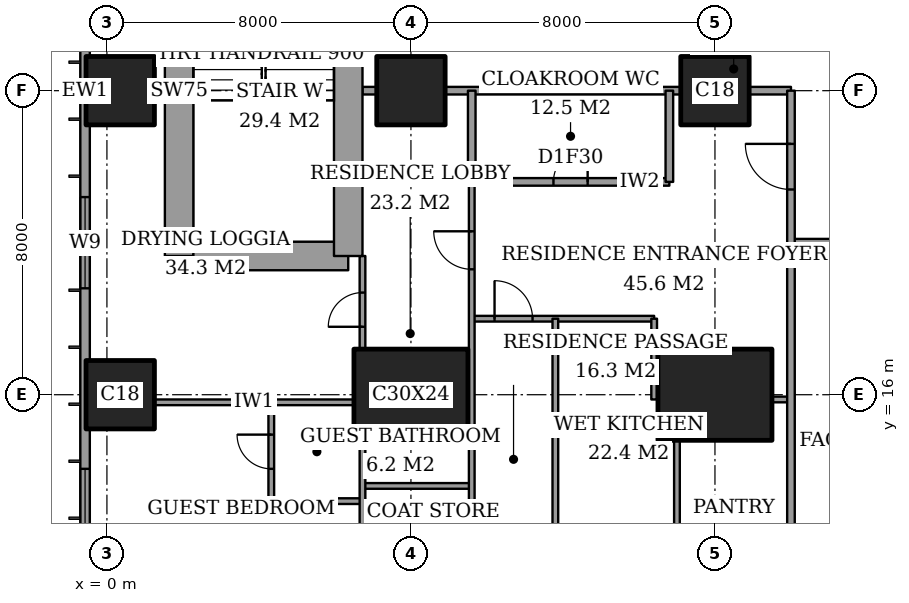
"""IFC4 building model, lengths in metres.
Left out: names, types, materials, properties, quantities, classifications, styles, units other than length and angle.
Written with IfcOpenShell. Run it as: python <this file> out.ifc"""

import sys

from ifc_helpers import new_model, si_unit, direction, frame, frame_2d, origin, origin_2d, place, context, subcontext, project, spatial, rectangle, extrude, element, fill, save


model = new_model("IFC4")
c1 = context("Model", 3, precision=1e-05, world=origin(), true_north=direction((0.0, 1.0)))
c2 = subcontext(c1, "Body", "Model", "MODEL_VIEW")
j1 = project(units=[si_unit("LENGTHUNIT", "METRE"), si_unit("PLANEANGLEUNIT", "RADIAN")], contexts=[c1])
p1 = place(None, origin())
s1 = spatial("IfcSite", under=j1, at=p1, CompositionType="ELEMENT")
p2 = place(p1, origin())
s2 = spatial("IfcBuilding", under=s1, at=p2, CompositionType="ELEMENT")
p3 = place(p2, frame((0.0, 0.0, 182.2)))
s3 = spatial("IfcBuildingStorey", under=s2, at=p3, CompositionType="ELEMENT", Elevation=182.2)
for number, where, z_axis, x_axis in (
    (1, (0.35, 16.0, 0.0), (0.0, 0.0, 1.0), (1.0, 0.0, 0.0)),
    (2, (0.35, 24.0, 0.0), (0.0, 0.0, 1.0), (1.0, 0.0, 0.0)),
):
    element("IfcColumn", number, at=place(p3, frame(where, z_axis=z_axis, x_axis=x_axis)), inside=s3, PredefinedType="COLUMN", context=c2, shape_type="SweptSolid", body=[
        extrude(rectangle(XDim=1.8, YDim=1.8, at=origin_2d()), origin(), (0.0, 0.0, 1.0), 3.6),
    ])
p4 = place(p3, frame((8.0, 16.0, 0.0), z_axis=(0.0, 0.0, 1.0), x_axis=(1.0, 0.0, 0.0)))
e3 = element("IfcColumn", 3, at=p4, inside=s3, PredefinedType="COLUMN", context=c2, shape_type="SweptSolid", body=[
    extrude(rectangle(XDim=3.0, YDim=2.4, at=origin_2d()), origin(), (0.0, 0.0, 1.0), 3.6),
])
p5 = place(p3, frame((8.0, 24.0, 0.0), z_axis=(0.0, 0.0, 1.0), x_axis=(1.0, 0.0, 0.0)))
e4 = element("IfcColumn", 4, at=p5, inside=s3, PredefinedType="COLUMN", context=c2, shape_type="SweptSolid", body=[
    extrude(rectangle(XDim=1.8, YDim=1.8, at=origin_2d()), origin(), (0.0, 0.0, 1.0), 3.6),
])
p6 = place(p3, frame((16.0, 16.0, 0.0), z_axis=(0.0, 0.0, 1.0), x_axis=(1.0, 0.0, 0.0)))
e5 = element("IfcColumn", 5, at=p6, inside=s3, PredefinedType="COLUMN", context=c2, shape_type="SweptSolid", body=[
    extrude(rectangle(XDim=3.0, YDim=2.4, at=origin_2d()), origin(), (0.0, 0.0, 1.0), 3.6),
])
p7 = place(p3, frame((16.0, 24.0, 0.0), z_axis=(0.0, 0.0, 1.0), x_axis=(1.0, 0.0, 0.0)))
e6 = element("IfcColumn", 6, at=p7, inside=s3, PredefinedType="COLUMN", context=c2, shape_type="SweptSolid", body=[
    extrude(rectangle(XDim=1.8, YDim=1.8, at=origin_2d()), origin(), (0.0, 0.0, 1.0), 3.6),
])
p8 = place(p3, frame((1.9, 19.65, 0.0), z_axis=(0.0, 0.0, 1.0), x_axis=(1.0, 0.0, 0.0)))
e7 = element("IfcWall", 7, at=p8, inside=s3, PredefinedType="SHEAR", context=c2, shape_type="SweptSolid", body=[
    extrude(rectangle(XDim=4.45, YDim=0.75, at=frame_2d((2.225, 0.0))), origin(), (0.0, 0.0, 1.0), 3.6),
])
p9 = place(p3, frame((6.35, 19.65, 0.0), z_axis=(0.0, 0.0, 1.0), x_axis=(0.0, 1.0, 0.0)))
e8 = element("IfcWall", 8, at=p9, inside=s3, PredefinedType="SHEAR", context=c2, shape_type="SweptSolid", body=[
    extrude(rectangle(XDim=8.7, YDim=0.75, at=frame_2d((4.35, 0.0))), origin(), (0.0, 0.0, 1.0), 3.6),
])
p10 = place(p9, frame((6.725, 0.0, 0.0)))
e9 = element("IfcOpeningElement", 9, at=p10, cuts=e8, PredefinedType="OPENING", context=c2, shape_type="SweptSolid", body=[
    extrude(rectangle(XDim=1.0, YDim=2.1, at=frame_2d((0.5, 1.05))), frame((0.0, 0.385, 0.0), z_axis=(0.0, -1.0, 0.0), x_axis=(1.0, 0.0, 0.0)), (0.0, 0.0, 1.0), 0.77),
])
p11 = place(p3, frame((1.9, 28.35, 0.0), z_axis=(0.0, 0.0, 1.0), x_axis=(0.0, -1.0, 0.0)))
e10 = element("IfcWall", 10, at=p11, inside=s3, PredefinedType="SHEAR", context=c2, shape_type="SweptSolid", body=[
    extrude(rectangle(XDim=8.7, YDim=0.75, at=frame_2d((4.35, 0.0))), origin(), (0.0, 0.0, 1.0), 3.6),
])
p12 = place(p3, frame((-0.575, 44.825, 0.0), z_axis=(0.0, 0.0, 1.0), x_axis=(0.0, -1.0, 0.0)))
e11 = element("IfcWall", 11, at=p12, inside=s3, PredefinedType="SOLIDWALL", context=c2, shape_type="SweptSolid", body=[
    extrude(rectangle(XDim=41.65, YDim=0.25, at=frame_2d((20.825, 0.0))), origin(), (0.0, 0.0, 1.0), 3.6),
])
p13 = place(p12, frame((0.825, 0.0, 0.2)))
e12 = element("IfcOpeningElement", 12, at=p13, cuts=e11, PredefinedType="OPENING", context=c2, shape_type="SweptSolid", body=[
    extrude(rectangle(XDim=2.4, YDim=2.4, at=frame_2d((1.2, 1.2))), frame((0.0, 0.135, 0.0), z_axis=(0.0, -1.0, 0.0), x_axis=(1.0, 0.0, 0.0)), (0.0, 0.0, 1.0), 0.27),
])
p14 = place(p12, frame((6.05, 0.0, 0.2)))
e13 = element("IfcOpeningElement", 13, at=p14, cuts=e11, PredefinedType="OPENING", context=c2, shape_type="SweptSolid", body=[
    extrude(rectangle(XDim=1.2, YDim=2.4, at=frame_2d((0.6, 1.2))), frame((0.0, 0.135, 0.0), z_axis=(0.0, -1.0, 0.0), x_axis=(1.0, 0.0, 0.0)), (0.0, 0.0, 1.0), 0.27),
])
p15 = place(p12, frame((8.475, 0.0, 0.2)))
e14 = element("IfcOpeningElement", 14, at=p15, cuts=e11, PredefinedType="OPENING", context=c2, shape_type="SweptSolid", body=[
    extrude(rectangle(XDim=2.4, YDim=2.4, at=frame_2d((1.2, 1.2))), frame((0.0, 0.135, 0.0), z_axis=(0.0, -1.0, 0.0), x_axis=(1.0, 0.0, 0.0)), (0.0, 0.0, 1.0), 0.27),
])
p16 = place(p12, frame((15.625, 0.0, 0.2)))
e15 = element("IfcOpeningElement", 15, at=p16, cuts=e11, PredefinedType="OPENING", context=c2, shape_type="SweptSolid", body=[
    extrude(rectangle(XDim=2.4, YDim=2.4, at=frame_2d((1.2, 1.2))), frame((0.0, 0.135, 0.0), z_axis=(0.0, -1.0, 0.0), x_axis=(1.0, 0.0, 0.0)), (0.0, 0.0, 1.0), 0.27),
])
p17 = place(p12, frame((23.625, 0.0, 0.2)))
e16 = element("IfcOpeningElement", 16, at=p17, cuts=e11, PredefinedType="OPENING", context=c2, shape_type="SweptSolid", body=[
    extrude(rectangle(XDim=2.4, YDim=2.4, at=frame_2d((1.2, 1.2))), frame((0.0, 0.135, 0.0), z_axis=(0.0, -1.0, 0.0), x_axis=(1.0, 0.0, 0.0)), (0.0, 0.0, 1.0), 0.27),
])
p18 = place(p12, frame((30.775, 0.0, 0.2)))
e17 = element("IfcOpeningElement", 17, at=p18, cuts=e11, PredefinedType="OPENING", context=c2, shape_type="SweptSolid", body=[
    extrude(rectangle(XDim=2.4, YDim=2.4, at=frame_2d((1.2, 1.2))), frame((0.0, 0.135, 0.0), z_axis=(0.0, -1.0, 0.0), x_axis=(1.0, 0.0, 0.0)), (0.0, 0.0, 1.0), 0.27),
])
p19 = place(p12, frame((34.55, 0.0, 0.2)))
e18 = element("IfcOpeningElement", 18, at=p19, cuts=e11, PredefinedType="OPENING", context=c2, shape_type="SweptSolid", body=[
    extrude(rectangle(XDim=1.2, YDim=2.4, at=frame_2d((0.6, 1.2))), frame((0.0, 0.135, 0.0), z_axis=(0.0, -1.0, 0.0), x_axis=(1.0, 0.0, 0.0)), (0.0, 0.0, 1.0), 0.27),
])
p20 = place(p12, frame((38.425, 0.0, 0.2)))
e19 = element("IfcOpeningElement", 19, at=p20, cuts=e11, PredefinedType="OPENING", context=c2, shape_type="SweptSolid", body=[
    extrude(rectangle(XDim=2.4, YDim=2.4, at=frame_2d((1.2, 1.2))), frame((0.0, 0.135, 0.0), z_axis=(0.0, -1.0, 0.0), x_axis=(1.0, 0.0, 0.0)), (0.0, 0.0, 1.0), 0.27),
])
p21 = place(p3, frame((4.325, 13.2, 0.0), z_axis=(0.0, 0.0, 1.0), x_axis=(1.0, 0.0, 0.0)))
e20 = element("IfcWall", 20, at=p21, inside=s3, PredefinedType="PARTITIONING", context=c2, shape_type="SweptSolid", body=[
    extrude(rectangle(XDim=2.4, YDim=0.15, at=frame_2d((1.2, 0.0))), origin(), (0.0, 0.0, 1.0), 3.35),
])
p22 = place(p3, frame((6.725, 13.6, 0.0), z_axis=(0.0, 0.0, 1.0), x_axis=(1.0, 0.0, 0.0)))
e21 = element("IfcWall", 21, at=p22, inside=s3, PredefinedType="PARTITIONING", context=c2, shape_type="SweptSolid", body=[
    extrude(rectangle(XDim=2.875, YDim=0.15, at=frame_2d((1.438, 0.0))), origin(), (0.0, 0.0, 1.0), 3.35),
])
p23 = place(p3, frame((1.25, 15.8, 0.0), z_axis=(0.0, 0.0, 1.0), x_axis=(1.0, 0.0, 0.0)))
e22 = element("IfcWall", 22, at=p23, inside=s3, PredefinedType="PARTITIONING", context=c2, shape_type="SweptSolid", body=[
    extrude(rectangle(XDim=5.25, YDim=0.15, at=frame_2d((2.625, 0.0))), origin(), (0.0, 0.0, 1.0), 3.35),
])
p24 = place(p3, frame((17.5, 15.875, 0.0), z_axis=(0.0, 0.0, 1.0), x_axis=(1.0, 0.0, 0.0)))
e23 = element("IfcWall", 23, at=p24, inside=s3, PredefinedType="PARTITIONING", context=c2, shape_type="SweptSolid", body=[
    extrude(rectangle(XDim=0.5, YDim=0.15, at=frame_2d((0.25, 0.0))), origin(), (0.0, 0.0, 1.0), 2.634),
])
p25 = place(p3, frame((9.6, 18.0, 0.0), z_axis=(0.0, 0.0, 1.0), x_axis=(1.0, 0.0, 0.0)))
e24 = element("IfcWall", 24, at=p25, inside=s3, PredefinedType="PARTITIONING", context=c2, shape_type="SweptSolid", body=[
    extrude(rectangle(XDim=4.8, YDim=0.15, at=frame_2d((2.4, 0.0))), origin(), (0.0, 0.0, 1.0), 3.35),
])
p26 = place(p25, frame((0.6, 0.0, 0.0)))
e25 = element("IfcOpeningElement", 25, at=p26, cuts=e24, PredefinedType="OPENING", context=c2, shape_type="SweptSolid", body=[
    extrude(rectangle(XDim=1.0, YDim=2.1, at=frame_2d((0.5, 1.05))), frame((0.0, 0.085, 0.0), z_axis=(0.0, -1.0, 0.0), x_axis=(1.0, 0.0, 0.0)), (0.0, 0.0, 1.0), 0.17),
])
p27 = place(p3, frame((18.0, 20.0, 0.0), z_axis=(0.0, 0.0, 1.0), x_axis=(1.0, 0.0, 0.0)))
e26 = element("IfcWall", 26, at=p27, inside=s3, PredefinedType="PARTITIONING", context=c2, shape_type="SweptSolid", body=[
    extrude(rectangle(XDim=6.0, YDim=0.2, at=frame_2d((3.0, 0.0))), origin(), (0.0, 0.0, 1.0), 3.35),
])
p28 = place(p27, frame((2.5, 0.0, 0.0)))
e27 = element("IfcOpeningElement", 27, at=p28, cuts=e26, PredefinedType="OPENING", context=c2, shape_type="SweptSolid", body=[
    extrude(rectangle(XDim=1.0, YDim=2.1, at=frame_2d((0.5, 1.05))), frame((0.0, 0.11, 0.0), z_axis=(0.0, -1.0, 0.0), x_axis=(1.0, 0.0, 0.0)), (0.0, 0.0, 1.0), 0.22),
])
p29 = place(p3, frame((9.6, 21.6, 0.0), z_axis=(0.0, 0.0, 1.0), x_axis=(1.0, 0.0, 0.0)))
e28 = element("IfcWall", 28, at=p29, inside=s3, PredefinedType="PARTITIONING", context=c2, shape_type="SweptSolid", body=[
    extrude(rectangle(XDim=5.2, YDim=0.2, at=frame_2d((2.6, 0.0))), origin(), (0.0, 0.0, 1.0), 3.35),
])
p30 = place(p29, frame((2.15, 0.0, 0.0)))
e29 = element("IfcOpeningElement", 29, at=p30, cuts=e28, PredefinedType="OPENING", context=c2, shape_type="SweptSolid", body=[
    extrude(rectangle(XDim=0.9, YDim=2.1, at=frame_2d((0.45, 1.05))), frame((0.0, 0.11, 0.0), z_axis=(0.0, -1.0, 0.0), x_axis=(1.0, 0.0, 0.0)), (0.0, 0.0, 1.0), 0.22),
])
p31 = place(p3, frame((6.725, 24.0, 0.0), z_axis=(0.0, 0.0, 1.0), x_axis=(1.0, 0.0, 0.0)))
e30 = element("IfcWall", 30, at=p31, inside=s3, PredefinedType="PARTITIONING", context=c2, shape_type="SweptSolid", body=[
    extrude(rectangle(XDim=0.375, YDim=0.2, at=frame_2d((0.188, 0.0))), origin(), (0.0, 0.0, 1.0), 3.35),
])
p32 = place(p3, frame((8.9, 24.0, 0.0), z_axis=(0.0, 0.0, 1.0), x_axis=(1.0, 0.0, 0.0)))
e31 = element("IfcWall", 31, at=p32, inside=s3, PredefinedType="PARTITIONING", context=c2, shape_type="SweptSolid", body=[
    extrude(rectangle(XDim=6.2, YDim=0.2, at=frame_2d((3.1, 0.0))), origin(), (0.0, 0.0, 1.0), 3.35),
])
p33 = place(p3, frame((16.9, 24.0, 0.0), z_axis=(0.0, 0.0, 1.0), x_axis=(1.0, 0.0, 0.0)))
e32 = element("IfcWall", 32, at=p33, inside=s3, PredefinedType="PARTITIONING", context=c2, shape_type="SweptSolid", body=[
    extrude(rectangle(XDim=1.1, YDim=0.2, at=frame_2d((0.55, 0.0))), origin(), (0.0, 0.0, 1.0), 3.35),
])
p34 = place(p3, frame((4.325, 13.2, 0.0), z_axis=(0.0, 0.0, 1.0), x_axis=(0.0, 1.0, 0.0)))
e33 = element("IfcWall", 33, at=p34, inside=s3, PredefinedType="PARTITIONING", context=c2, shape_type="SweptSolid", body=[
    extrude(rectangle(XDim=2.6, YDim=0.15, at=frame_2d((1.3, 0.0))), origin(), (0.0, 0.0, 1.0), 3.35),
])
p35 = place(p34, frame((0.85, 0.0, 0.0)))
e34 = element("IfcOpeningElement", 34, at=p35, cuts=e33, PredefinedType="OPENING", context=c2, shape_type="SweptSolid", body=[
    extrude(rectangle(XDim=0.9, YDim=2.1, at=frame_2d((0.45, 1.05))), frame((0.0, 0.085, 0.0), z_axis=(0.0, -1.0, 0.0), x_axis=(1.0, 0.0, 0.0)), (0.0, 0.0, 1.0), 0.17),
])
p36 = place(p3, frame((6.725, 10.6, 0.0), z_axis=(0.0, 0.0, 1.0), x_axis=(0.0, 1.0, 0.0)))
e35 = element("IfcWall", 35, at=p36, inside=s3, PredefinedType="PARTITIONING", context=c2, shape_type="SweptSolid", body=[
    extrude(rectangle(XDim=4.2, YDim=0.15, at=frame_2d((2.1, 0.0))), origin(), (0.0, 0.0, 1.0), 3.35),
])
p37 = place(p3, frame((6.725, 17.2, 0.0), z_axis=(0.0, 0.0, 1.0), x_axis=(0.0, 1.0, 0.0)))
e36 = element("IfcWall", 36, at=p37, inside=s3, PredefinedType="PARTITIONING", context=c2, shape_type="SweptSolid", body=[
    extrude(rectangle(XDim=2.45, YDim=0.15, at=frame_2d((1.225, 0.0))), origin(), (0.0, 0.0, 1.0), 3.35),
])
p38 = place(p37, frame((0.587, 0.0, 0.0)))
e37 = element("IfcOpeningElement", 37, at=p38, cuts=e36, PredefinedType="OPENING", context=c2, shape_type="SweptSolid", body=[
    extrude(rectangle(XDim=0.9, YDim=2.1, at=frame_2d((0.45, 1.05))), frame((0.0, 0.085, 0.0), z_axis=(0.0, -1.0, 0.0), x_axis=(1.0, 0.0, 0.0)), (0.0, 0.0, 1.0), 0.17),
])
p39 = place(p3, frame((9.6, 21.6, 0.0), z_axis=(0.0, 0.0, 1.0), x_axis=(0.0, 1.0, 0.0)))
e38 = element("IfcWall", 38, at=p39, inside=s3, PredefinedType="PARTITIONING", context=c2, shape_type="SweptSolid", body=[
    extrude(rectangle(XDim=2.4, YDim=0.2, at=frame_2d((1.2, 0.0))), origin(), (0.0, 0.0, 1.0), 3.35),
])
p40 = place(p3, frame((9.6, 10.6, 0.0), z_axis=(0.0, 0.0, 1.0), x_axis=(0.0, 1.0, 0.0)))
e39 = element("IfcWall", 39, at=p40, inside=s3, PredefinedType="PARTITIONING", context=c2, shape_type="SweptSolid", body=[
    extrude(rectangle(XDim=11.0, YDim=0.15, at=frame_2d((5.5, 0.0))), origin(), (0.0, 0.0, 1.0), 3.35),
])
p41 = place(p40, frame((8.7, 0.0, 0.0)))
e40 = element("IfcOpeningElement", 40, at=p41, cuts=e39, PredefinedType="OPENING", context=c2, shape_type="SweptSolid", body=[
    extrude(rectangle(XDim=1.0, YDim=2.1, at=frame_2d((0.5, 1.05))), frame((0.0, 0.085, 0.0), z_axis=(0.0, -1.0, 0.0), x_axis=(1.0, 0.0, 0.0)), (0.0, 0.0, 1.0), 0.17),
])
p42 = place(p3, frame((11.8, 10.6, 0.0), z_axis=(0.0, 0.0, 1.0), x_axis=(0.0, 1.0, 0.0)))
e41 = element("IfcWall", 41, at=p42, inside=s3, PredefinedType="PARTITIONING", context=c2, shape_type="SweptSolid", body=[
    extrude(rectangle(XDim=7.4, YDim=0.15, at=frame_2d((3.7, 0.0))), origin(), (0.0, 0.0, 1.0), 3.35),
])
p43 = place(p3, frame((14.4, 15.875, 0.0), z_axis=(0.0, 0.0, 1.0), x_axis=(0.0, 1.0, 0.0)))
e42 = element("IfcWall", 42, at=p43, inside=s3, PredefinedType="PARTITIONING", context=c2, shape_type="SweptSolid", body=[
    extrude(rectangle(XDim=2.125, YDim=0.15, at=frame_2d((1.062, 0.0))), origin(), (0.0, 0.0, 1.0), 3.35),
])
p44 = place(p3, frame((14.8, 21.6, 0.0), z_axis=(0.0, 0.0, 1.0), x_axis=(0.0, 1.0, 0.0)))
e43 = element("IfcWall", 43, at=p44, inside=s3, PredefinedType="PARTITIONING", context=c2, shape_type="SweptSolid", body=[
    extrude(rectangle(XDim=2.4, YDim=0.2, at=frame_2d((1.2, 0.0))), origin(), (0.0, 0.0, 1.0), 3.35),
])
p45 = place(p3, frame((15.0, 10.6, 0.0), z_axis=(0.0, 0.0, 1.0), x_axis=(0.0, 1.0, 0.0)))
e44 = element("IfcWall", 44, at=p45, inside=s3, PredefinedType="PARTITIONING", context=c2, shape_type="SweptSolid", body=[
    extrude(rectangle(XDim=4.2, YDim=0.15, at=frame_2d((2.1, 0.0))), origin(), (0.0, 0.0, 1.0), 3.35),
])
p46 = place(p3, frame((18.0, 9.8, 0.0), z_axis=(0.0, 0.0, 1.0), x_axis=(0.0, 1.0, 0.0)))
e45 = element("IfcWall", 45, at=p46, inside=s3, PredefinedType="PARTITIONING", context=c2, shape_type="SweptSolid", body=[
    extrude(rectangle(XDim=14.2, YDim=0.2, at=frame_2d((7.1, 0.0))), origin(), (0.0, 0.0, 1.0), 3.35),
])
p47 = place(p46, frame((11.6, 0.0, 0.0)))
e46 = element("IfcOpeningElement", 46, at=p47, cuts=e45, PredefinedType="OPENING", context=c2, shape_type="SweptSolid", body=[
    extrude(rectangle(XDim=1.2, YDim=2.4, at=frame_2d((0.6, 1.2))), frame((0.0, 0.11, 0.0), z_axis=(0.0, -1.0, 0.0), x_axis=(1.0, 0.0, 0.0)), (0.0, 0.0, 1.0), 0.22),
])
p48 = place(p17, origin())
e47 = element("IfcWindow", 47, at=p48, inside=s3, PartitioningType="SINGLE_PANEL", PredefinedType="WINDOW", context=c2, shape_type="SweptSolid", body=[
    extrude(rectangle(XDim=2.4, YDim=2.4, at=frame_2d((1.2, 1.2))), frame((0.0, 0.03, 0.0), z_axis=(0.0, -1.0, 0.0), x_axis=(1.0, 0.0, 0.0)), (0.0, 0.0, 1.0), 0.06),
])
fill(e16, e47)
p49 = place(p18, origin())
e48 = element("IfcWindow", 48, at=p49, inside=s3, PartitioningType="SINGLE_PANEL", PredefinedType="WINDOW", context=c2, shape_type="SweptSolid", body=[
    extrude(rectangle(XDim=2.4, YDim=2.4, at=frame_2d((1.2, 1.2))), frame((0.0, 0.03, 0.0), z_axis=(0.0, -1.0, 0.0), x_axis=(1.0, 0.0, 0.0)), (0.0, 0.0, 1.0), 0.06),
])
fill(e17, e48)
p50 = place(p35, origin())
e49 = element("IfcDoor", 49, at=p50, inside=s3, OperationType="SINGLE_SWING_LEFT", PredefinedType="DOOR", context=c2, shape_type="SweptSolid", body=[
    extrude(rectangle(XDim=0.9, YDim=2.1, at=frame_2d((0.45, 1.05))), frame((0.0, 0.025, 0.0), z_axis=(0.0, -1.0, 0.0), x_axis=(1.0, 0.0, 0.0)), (0.0, 0.0, 1.0), 0.05),
])
fill(e34, e49)
p51 = place(p38, origin())
e50 = element("IfcDoor", 50, at=p51, inside=s3, OperationType="SINGLE_SWING_RIGHT", PredefinedType="DOOR", context=c2, shape_type="SweptSolid", body=[
    extrude(rectangle(XDim=0.9, YDim=2.1, at=frame_2d((0.45, 1.05))), frame((0.0, 0.025, 0.0), z_axis=(0.0, -1.0, 0.0), x_axis=(1.0, 0.0, 0.0)), (0.0, 0.0, 1.0), 0.05),
])
fill(e37, e50)
p52 = place(p41, origin())
e51 = element("IfcDoor", 51, at=p52, inside=s3, OperationType="SINGLE_SWING_LEFT", PredefinedType="DOOR", context=c2, shape_type="SweptSolid", body=[
    extrude(rectangle(XDim=1.0, YDim=2.1, at=frame_2d((0.5, 1.05))), frame((0.0, 0.025, 0.0), z_axis=(0.0, -1.0, 0.0), x_axis=(1.0, 0.0, 0.0)), (0.0, 0.0, 1.0), 0.05),
])
fill(e40, e51)
p53 = place(p30, origin())
e52 = element("IfcDoor", 52, at=p53, inside=s3, OperationType="SINGLE_SWING_LEFT", PredefinedType="DOOR", context=c2, shape_type="SweptSolid", body=[
    extrude(rectangle(XDim=0.9, YDim=2.1, at=frame_2d((0.45, 1.05))), frame((0.0, 0.025, 0.0), z_axis=(0.0, -1.0, 0.0), x_axis=(1.0, 0.0, 0.0)), (0.0, 0.0, 1.0), 0.05),
])
fill(e29, e52)
p54 = place(p47, origin())
e53 = element("IfcDoor", 53, at=p54, inside=s3, OperationType="SINGLE_SWING_LEFT", PredefinedType="DOOR", context=c2, shape_type="SweptSolid", body=[
    extrude(rectangle(XDim=1.2, YDim=2.4, at=frame_2d((0.6, 1.2))), frame((0.0, 0.025, 0.0), z_axis=(0.0, -1.0, 0.0), x_axis=(1.0, 0.0, 0.0)), (0.0, 0.0, 1.0), 0.05),
])
fill(e46, e53)
p55 = place(p26, origin())
e54 = element("IfcDoor", 54, at=p55, inside=s3, OperationType="SINGLE_SWING_RIGHT", PredefinedType="DOOR", context=c2, shape_type="SweptSolid", body=[
    extrude(rectangle(XDim=1.0, YDim=2.1, at=frame_2d((0.5, 1.05))), frame((0.0, 0.025, 0.0), z_axis=(0.0, -1.0, 0.0), x_axis=(1.0, 0.0, 0.0)), (0.0, 0.0, 1.0), 0.05),
])
fill(e25, e54)
save(model, sys.argv[1])
